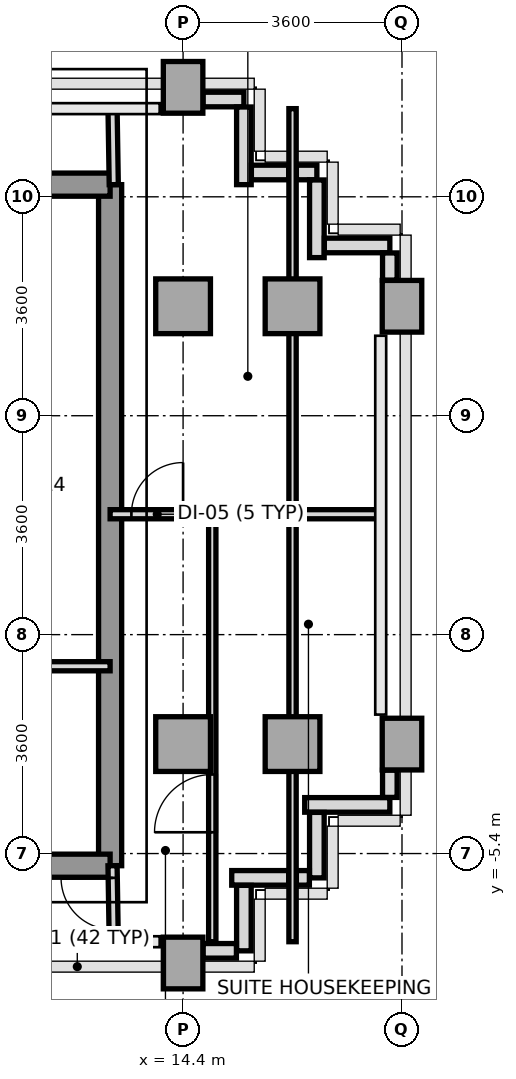
"""IFC4 building model, lengths in metres.
Left out: names, types, materials, properties, quantities, classifications, styles, units other than length and angle.
Written with IfcOpenShell. Run it as: python <this file> out.ifc"""

import sys

from ifc_helpers import new_model, si_unit, direction, frame, frame_2d, origin, origin_2d, place, context, subcontext, project, spatial, rectangle, extrude, source, transform, mapped, element, fill, save


model = new_model("IFC4")
c1 = context("Model", 3, precision=1e-05, world=origin(), true_north=direction((0.0, 1.0)))
c2 = subcontext(c1, "Body", "Model", "MODEL_VIEW")
j1 = project(units=[si_unit("LENGTHUNIT", "METRE"), si_unit("PLANEANGLEUNIT", "RADIAN")], contexts=[c1])
p1 = place(None, origin())
s1 = spatial("IfcSite", under=j1, at=p1, CompositionType="ELEMENT")
p2 = place(p1, origin())
s2 = spatial("IfcBuilding", under=s1, at=p2, CompositionType="ELEMENT")
p3 = place(p2, frame((0.0, 0.0, 194.4)))
s3 = spatial("IfcBuildingStorey", under=s2, at=p3, CompositionType="ELEMENT", Elevation=194.4)
m1 = source(origin(), c2, "Body", "SweptSolid", [
    extrude(rectangle(XDim=0.65, YDim=0.85, at=origin_2d()), origin(), (0.0, 0.0, 1.0), 3.2),
])
p4 = place(p3, frame((14.4, -7.2, 0.0), z_axis=(0.0, 0.0, 1.0), x_axis=(1.0, 0.0, 0.0)))
e1 = element("IfcColumn", 1, at=p4, inside=s3, PredefinedType="COLUMN", context=c2, shape_type="MappedRepresentation", body=[
    mapped(m1, transform((0.0, 0.0, 0.0), x_axis=(1.0, 0.0, 0.0), y_axis=(0.0, 1.0, 0.0), z_axis=(0.0, 0.0, 1.0), scale=1.0)),
])
m2 = source(origin(), c2, "Body", "SweptSolid", [
    extrude(rectangle(XDim=0.9, YDim=0.9, at=origin_2d()), origin(), (0.0, 0.0, 1.0), 3.2),
])
for number, where, z_axis, x_axis in (
    (2, (14.4, -3.6, 0.0), (0.0, 0.0, 1.0), (1.0, 0.0, 0.0)),
    (3, (14.4, 3.6, 0.0), (0.0, 0.0, 1.0), (1.0, 0.0, 0.0)),
):
    element("IfcColumn", number, at=place(p3, frame(where, z_axis=z_axis, x_axis=x_axis)), inside=s3, PredefinedType="COLUMN", context=c2, shape_type="MappedRepresentation", body=[
        mapped(m2, transform((0.0, 0.0, 0.0), x_axis=(1.0, 0.0, 0.0), y_axis=(0.0, 1.0, 0.0), z_axis=(0.0, 0.0, 1.0), scale=1.0)),
    ])
p5 = place(p3, frame((14.4, 7.2, 0.0), z_axis=(0.0, 0.0, 1.0), x_axis=(1.0, 0.0, 0.0)))
e4 = element("IfcColumn", 4, at=p5, inside=s3, PredefinedType="COLUMN", context=c2, shape_type="MappedRepresentation", body=[
    mapped(m1, transform((0.0, 0.0, 0.0), x_axis=(1.0, 0.0, 0.0), y_axis=(0.0, 1.0, 0.0), z_axis=(0.0, 0.0, 1.0), scale=1.0)),
])
for number, where, z_axis, x_axis in (
    (5, (16.2, -3.6, 0.0), (0.0, 0.0, 1.0), (1.0, 0.0, 0.0)),
    (6, (16.2, 3.6, 0.0), (0.0, 0.0, 1.0), (1.0, 0.0, 0.0)),
):
    element("IfcColumn", number, at=place(p3, frame(where, z_axis=z_axis, x_axis=x_axis)), inside=s3, PredefinedType="COLUMN", context=c2, shape_type="MappedRepresentation", body=[
        mapped(m2, transform((0.0, 0.0, 0.0), x_axis=(1.0, 0.0, 0.0), y_axis=(0.0, 1.0, 0.0), z_axis=(0.0, 0.0, 1.0), scale=1.0)),
    ])
for number, where, z_axis, x_axis in (
    (7, (18.0, -3.6, 0.0), (0.0, 0.0, 1.0), (1.0, 0.0, 0.0)),
    (8, (18.0, 3.6, 0.0), (0.0, 0.0, 1.0), (1.0, 0.0, 0.0)),
):
    element("IfcColumn", number, at=place(p3, frame(where, z_axis=z_axis, x_axis=x_axis)), inside=s3, PredefinedType="COLUMN", context=c2, shape_type="MappedRepresentation", body=[
        mapped(m1, transform((0.0, 0.0, 0.0), x_axis=(1.0, 0.0, 0.0), y_axis=(0.0, 1.0, 0.0), z_axis=(0.0, 0.0, 1.0), scale=1.0)),
    ])
p6 = place(p3, frame((17.8, -4.6, 0.0), z_axis=(0.0, 0.0, 1.0), x_axis=(-1.0, 0.0, 0.0)))
e9 = element("IfcWall", 9, at=p6, inside=s3, PredefinedType="PARAPET", context=c2, shape_type="SweptSolid", body=[
    extrude(rectangle(XDim=1.4, YDim=0.24, at=frame_2d((0.7, 0.0))), origin(), (0.0, 0.0, 1.0), 1.15),
])
p7 = place(p3, frame((16.6, -4.723, 0.0), z_axis=(0.0, 0.0, 1.0), x_axis=(0.0, -1.0, 0.0)))
e10 = element("IfcWall", 10, at=p7, inside=s3, PredefinedType="PARAPET", context=c2, shape_type="SweptSolid", body=[
    extrude(rectangle(XDim=1.077, YDim=0.24, at=frame_2d((0.539, 0.0))), origin(), (0.0, 0.0, 1.0), 1.15),
])
p8 = place(p3, frame((16.477, -5.8, 0.0), z_axis=(0.0, 0.0, 1.0), x_axis=(-1.0, 0.0, 0.0)))
e11 = element("IfcWall", 11, at=p8, inside=s3, PredefinedType="PARAPET", context=c2, shape_type="SweptSolid", body=[
    extrude(rectangle(XDim=0.214, YDim=0.24, at=frame_2d((0.107, 0.0))), origin(), (0.0, 0.0, 1.0), 1.15),
])
p9 = place(p3, frame((16.137, -5.8, 0.0), z_axis=(0.0, 0.0, 1.0), x_axis=(-1.0, 0.0, 0.0)))
e12 = element("IfcWall", 12, at=p9, inside=s3, PredefinedType="PARAPET", context=c2, shape_type="SweptSolid", body=[
    extrude(rectangle(XDim=0.937, YDim=0.24, at=frame_2d((0.469, 0.0))), origin(), (0.0, 0.0, 1.0), 1.15),
])
p10 = place(p3, frame((15.4, -5.923, 0.0), z_axis=(0.0, 0.0, 1.0), x_axis=(0.0, -1.0, 0.0)))
e13 = element("IfcWall", 13, at=p10, inside=s3, PredefinedType="PARAPET", context=c2, shape_type="SweptSolid", body=[
    extrude(rectangle(XDim=1.077, YDim=0.24, at=frame_2d((0.539, 0.0))), origin(), (0.0, 0.0, 1.0), 1.15),
])
p11 = place(p3, frame((15.277, -7.0, 0.0), z_axis=(0.0, 0.0, 1.0), x_axis=(-1.0, 0.0, 0.0)))
e14 = element("IfcWall", 14, at=p11, inside=s3, PredefinedType="PARAPET", context=c2, shape_type="SweptSolid", body=[
    extrude(rectangle(XDim=0.549, YDim=0.24, at=frame_2d((0.274, 0.0))), origin(), (0.0, 0.0, 1.0), 1.15),
])
p12 = place(p3, frame((14.728, 7.0, 0.0), z_axis=(0.0, 0.0, 1.0), x_axis=(1.0, 0.0, 0.0)))
e15 = element("IfcWall", 15, at=p12, inside=s3, PredefinedType="PARAPET", context=c2, shape_type="SweptSolid", body=[
    extrude(rectangle(XDim=0.672, YDim=0.24, at=frame_2d((0.336, 0.0))), origin(), (0.0, 0.0, 1.0), 1.15),
])
p13 = place(p3, frame((15.4, 6.877, 0.0), z_axis=(0.0, 0.0, 1.0), x_axis=(0.0, -1.0, 0.0)))
e16 = element("IfcWall", 16, at=p13, inside=s3, PredefinedType="PARAPET", context=c2, shape_type="SweptSolid", body=[
    extrude(rectangle(XDim=1.277, YDim=0.24, at=frame_2d((0.638, 0.0))), origin(), (0.0, 0.0, 1.0), 1.15),
])
p14 = place(p3, frame((15.523, 5.8, 0.0), z_axis=(0.0, 0.0, 1.0), x_axis=(1.0, 0.0, 0.0)))
e17 = element("IfcWall", 17, at=p14, inside=s3, PredefinedType="PARAPET", context=c2, shape_type="SweptSolid", body=[
    extrude(rectangle(XDim=0.614, YDim=0.24, at=frame_2d((0.307, 0.0))), origin(), (0.0, 0.0, 1.0), 1.15),
])
p15 = place(p3, frame((16.263, 5.8, 0.0), z_axis=(0.0, 0.0, 1.0), x_axis=(1.0, 0.0, 0.0)))
e18 = element("IfcWall", 18, at=p15, inside=s3, PredefinedType="PARAPET", context=c2, shape_type="SweptSolid", body=[
    extrude(rectangle(XDim=0.337, YDim=0.24, at=frame_2d((0.168, 0.0))), origin(), (0.0, 0.0, 1.0), 1.15),
])
p16 = place(p3, frame((16.6, 5.677, 0.0), z_axis=(0.0, 0.0, 1.0), x_axis=(0.0, -1.0, 0.0)))
e19 = element("IfcWall", 19, at=p16, inside=s3, PredefinedType="PARAPET", context=c2, shape_type="SweptSolid", body=[
    extrude(rectangle(XDim=1.277, YDim=0.24, at=frame_2d((0.639, 0.0))), origin(), (0.0, 0.0, 1.0), 1.15),
])
p17 = place(p3, frame((16.723, 4.6, 0.0), z_axis=(0.0, 0.0, 1.0), x_axis=(1.0, 0.0, 0.0)))
e20 = element("IfcWall", 20, at=p17, inside=s3, PredefinedType="PARAPET", context=c2, shape_type="SweptSolid", body=[
    extrude(rectangle(XDim=1.077, YDim=0.24, at=frame_2d((0.539, 0.0))), origin(), (0.0, 0.0, 1.0), 1.15),
])
for number, where, z_axis, x_axis in (
    (21, (17.8, 4.477, 0.0), (0.0, 0.0, 1.0), (0.0, -1.0, 0.0)),
    (22, (17.8, -4.028, 0.0), (0.0, 0.0, 1.0), (0.0, -1.0, 0.0)),
):
    element("IfcWall", number, at=place(p3, frame(where, z_axis=z_axis, x_axis=x_axis)), inside=s3, PredefinedType="PARAPET", context=c2, shape_type="SweptSolid", body=[
        extrude(rectangle(XDim=0.449, YDim=0.24, at=frame_2d((0.225, 0.0))), origin(), (0.0, 0.0, 1.0), 1.15),
    ])
p18 = place(p3, frame((13.2, -5.6, 0.0), z_axis=(0.0, 0.0, 1.0), x_axis=(0.0, 1.0, 0.0)))
e23 = element("IfcWall", 23, at=p18, inside=s3, PredefinedType="SHEAR", context=c2, shape_type="SweptSolid", body=[
    extrude(rectangle(XDim=11.2, YDim=0.38, at=frame_2d((5.6, 0.0))), origin(), (0.0, 0.0, 1.0), 3.2),
])
p19 = place(p3, frame((11.356, 5.6, 0.0), z_axis=(0.0, 0.0, 1.0), x_axis=(1.0, 0.0, 0.0)))
e24 = element("IfcWall", 24, at=p19, inside=s3, PredefinedType="SHEAR", context=c2, shape_type="SweptSolid", body=[
    extrude(rectangle(XDim=1.844, YDim=0.38, at=frame_2d((0.922, 0.0))), origin(), (0.0, 0.0, 1.0), 3.2),
])
p20 = place(p3, frame((5.4, -5.6, 0.0), z_axis=(0.0, 0.0, 1.0), x_axis=(1.0, 0.0, 0.0)))
e25 = element("IfcWall", 25, at=p20, inside=s3, PredefinedType="SHEAR", context=c2, shape_type="SweptSolid", body=[
    extrude(rectangle(XDim=7.8, YDim=0.38, at=frame_2d((3.9, 0.0))), origin(), (0.0, 0.0, 1.0), 3.2),
])
p21 = place(p20, frame((5.85, 0.0, 0.0)))
e26 = element("IfcOpeningElement", 26, at=p21, cuts=e25, PredefinedType="OPENING", context=c2, shape_type="SweptSolid", body=[
    extrude(rectangle(XDim=0.8, YDim=2.1, at=frame_2d((0.4, 1.05))), frame((0.0, 0.2, 0.0), z_axis=(0.0, -1.0, 0.0), x_axis=(1.0, 0.0, 0.0)), (0.0, 0.0, 1.0), 0.4),
])
p22 = place(p20, frame((3.4, 0.0, 0.0)))
e27 = element("IfcOpeningElement", 27, at=p22, cuts=e25, PredefinedType="OPENING", context=c2, shape_type="SweptSolid", body=[
    extrude(rectangle(XDim=0.95, YDim=2.15, at=frame_2d((0.475, 1.075))), frame((0.0, 0.2, 0.0), z_axis=(0.0, -1.0, 0.0), x_axis=(1.0, 0.0, 0.0)), (0.0, 0.0, 1.0), 0.4),
])
p23 = place(p3, frame((11.02, -2.32, 0.0), z_axis=(0.0, 0.0, 1.0), x_axis=(1.0, 0.0, 0.0)))
e28 = element("IfcWall", 28, at=p23, inside=s3, PredefinedType="PARTITIONING", context=c2, shape_type="SweptSolid", body=[
    extrude(rectangle(XDim=2.18, YDim=0.15, at=frame_2d((1.09, 0.0))), origin(), (0.0, 0.0, 1.0), 3.2),
])
p24 = place(p3, frame((13.26, 5.6, 0.0), z_axis=(0.0, 0.0, 1.0), x_axis=(-0.016013571389, 0.999871774545, 0.0)))
e29 = element("IfcWall", 29, at=p24, inside=s3, PredefinedType="PARTITIONING", context=c2, shape_type="SweptSolid", body=[
    extrude(rectangle(XDim=1.25, YDim=0.15, at=frame_2d((0.625, 0.0))), origin(), (0.0, 0.0, 1.0), 3.2),
])
p25 = place(p3, frame((13.26, -6.85, 0.0), z_axis=(0.0, 0.0, 1.0), x_axis=(-0.016013571389, 0.999871774545, 0.0)))
e30 = element("IfcWall", 30, at=p25, inside=s3, PredefinedType="PARTITIONING", context=c2, shape_type="SweptSolid", body=[
    extrude(rectangle(XDim=1.25, YDim=0.15, at=frame_2d((0.625, 0.0))), origin(), (0.0, 0.0, 1.0), 3.2),
])
p26 = place(p25, frame((0.2, 0.0, 0.0)))
e31 = element("IfcOpeningElement", 31, at=p26, cuts=e30, PredefinedType="OPENING", context=c2, shape_type="SweptSolid", body=[
    extrude(rectangle(XDim=0.85, YDim=2.1, at=frame_2d((0.425, 1.05))), frame((0.0, 0.085, 0.0), z_axis=(0.0, -1.0, 0.0), x_axis=(1.0, 0.0, 0.0)), (0.0, 0.0, 1.0), 0.17),
])
p27 = place(p3, frame((16.2, -6.85, 0.0), z_axis=(0.0, 0.0, 1.0), x_axis=(0.0, 1.0, 0.0)))
e32 = element("IfcWall", 32, at=p27, inside=s3, PredefinedType="PARTITIONING", context=c2, shape_type="SweptSolid", body=[
    extrude(rectangle(XDim=13.7, YDim=0.12, at=frame_2d((6.85, 0.0))), origin(), (0.0, 0.0, 1.0), 2.8),
])
p28 = place(p3, frame((14.9, 0.18, 0.0), z_axis=(0.0, 0.0, 1.0), x_axis=(1.0, 0.0, 0.0)))
e33 = element("IfcWall", 33, at=p28, inside=s3, PredefinedType="PARTITIONING", context=c2, shape_type="SweptSolid", body=[
    extrude(rectangle(XDim=2.75, YDim=0.15, at=frame_2d((1.375, 0.0))), origin(), (0.0, 0.0, 1.0), 2.8),
])
p29 = place(p3, frame((14.88, -6.85, 0.0), z_axis=(0.0, 0.0, 1.0), x_axis=(0.0, 1.0, 0.0)))
e34 = element("IfcWall", 34, at=p29, inside=s3, PredefinedType="PARTITIONING", context=c2, shape_type="SweptSolid", body=[
    extrude(rectangle(XDim=7.03, YDim=0.12, at=frame_2d((3.515, 0.0))), origin(), (0.0, 0.0, 1.0), 3.2),
])
p30 = place(p29, frame((1.8, 0.0, 0.0)))
e35 = element("IfcOpeningElement", 35, at=p30, cuts=e34, PredefinedType="OPENING", context=c2, shape_type="SweptSolid", body=[
    extrude(rectangle(XDim=0.95, YDim=2.15, at=frame_2d((0.475, 1.075))), frame((0.0, 0.07, 0.0), z_axis=(0.0, -1.0, 0.0), x_axis=(1.0, 0.0, 0.0)), (0.0, 0.0, 1.0), 0.14),
])
p31 = place(p3, frame((13.2, 0.18, 0.0), z_axis=(0.0, 0.0, 1.0), x_axis=(1.0, 0.0, 0.0)))
e36 = element("IfcWall", 36, at=p31, inside=s3, PredefinedType="PARTITIONING", context=c2, shape_type="SweptSolid", body=[
    extrude(rectangle(XDim=1.7, YDim=0.15, at=frame_2d((0.85, 0.0))), origin(), (0.0, 0.0, 1.0), 2.8),
])
p32 = place(p31, frame((0.35, 0.0, 0.0)))
e37 = element("IfcOpeningElement", 37, at=p32, cuts=e36, PredefinedType="OPENING", context=c2, shape_type="SweptSolid", body=[
    extrude(rectangle(XDim=0.85, YDim=2.1, at=frame_2d((0.425, 1.05))), frame((0.0, 0.085, 0.0), z_axis=(0.0, -1.0, 0.0), x_axis=(1.0, 0.0, 0.0)), (0.0, 0.0, 1.0), 0.17),
])
m3 = source(origin(), c2, "Body", "SweptSolid", [
    extrude(rectangle(XDim=0.85, YDim=2.1, at=frame_2d((0.425, 1.05))), frame((0.0, 0.025, 0.0), z_axis=(0.0, -1.0, 0.0), x_axis=(1.0, 0.0, 0.0)), (0.0, 0.0, 1.0), 0.05),
])
p33 = place(p26, origin())
e38 = element("IfcDoor", 38, at=p33, inside=s3, OperationType="SINGLE_SWING_RIGHT", PredefinedType="DOOR", context=c2, shape_type="MappedRepresentation", body=[
    mapped(m3, transform((0.0, 0.0, 0.0), x_axis=(1.0, 0.0, 0.0), y_axis=(0.0, 1.0, 0.0), z_axis=(0.0, 0.0, 1.0), scale=1.0)),
])
fill(e31, e38)
m4 = source(origin(), c2, "Body", "SweptSolid", [
    extrude(rectangle(XDim=0.95, YDim=2.15, at=frame_2d((0.475, 1.075))), frame((0.0, 0.025, 0.0), z_axis=(0.0, -1.0, 0.0), x_axis=(1.0, 0.0, 0.0)), (0.0, 0.0, 1.0), 0.05),
])
p34 = place(p30, origin())
e39 = element("IfcDoor", 39, at=p34, inside=s3, OperationType="SINGLE_SWING_LEFT", PredefinedType="DOOR", context=c2, shape_type="MappedRepresentation", body=[
    mapped(m4, transform((0.0, 0.0, 0.0), x_axis=(1.0, 0.0, 0.0), y_axis=(0.0, 1.0, 0.0), z_axis=(0.0, 0.0, 1.0), scale=1.0)),
])
fill(e35, e39)
p35 = place(p32, origin())
e40 = element("IfcDoor", 40, at=p35, inside=s3, OperationType="SINGLE_SWING_RIGHT", PredefinedType="DOOR", context=c2, shape_type="MappedRepresentation", body=[
    mapped(m3, transform((0.0, 0.0, 0.0), x_axis=(1.0, 0.0, 0.0), y_axis=(0.0, 1.0, 0.0), z_axis=(0.0, 0.0, 1.0), scale=1.0)),
])
fill(e37, e40)
save(model, sys.argv[1])
